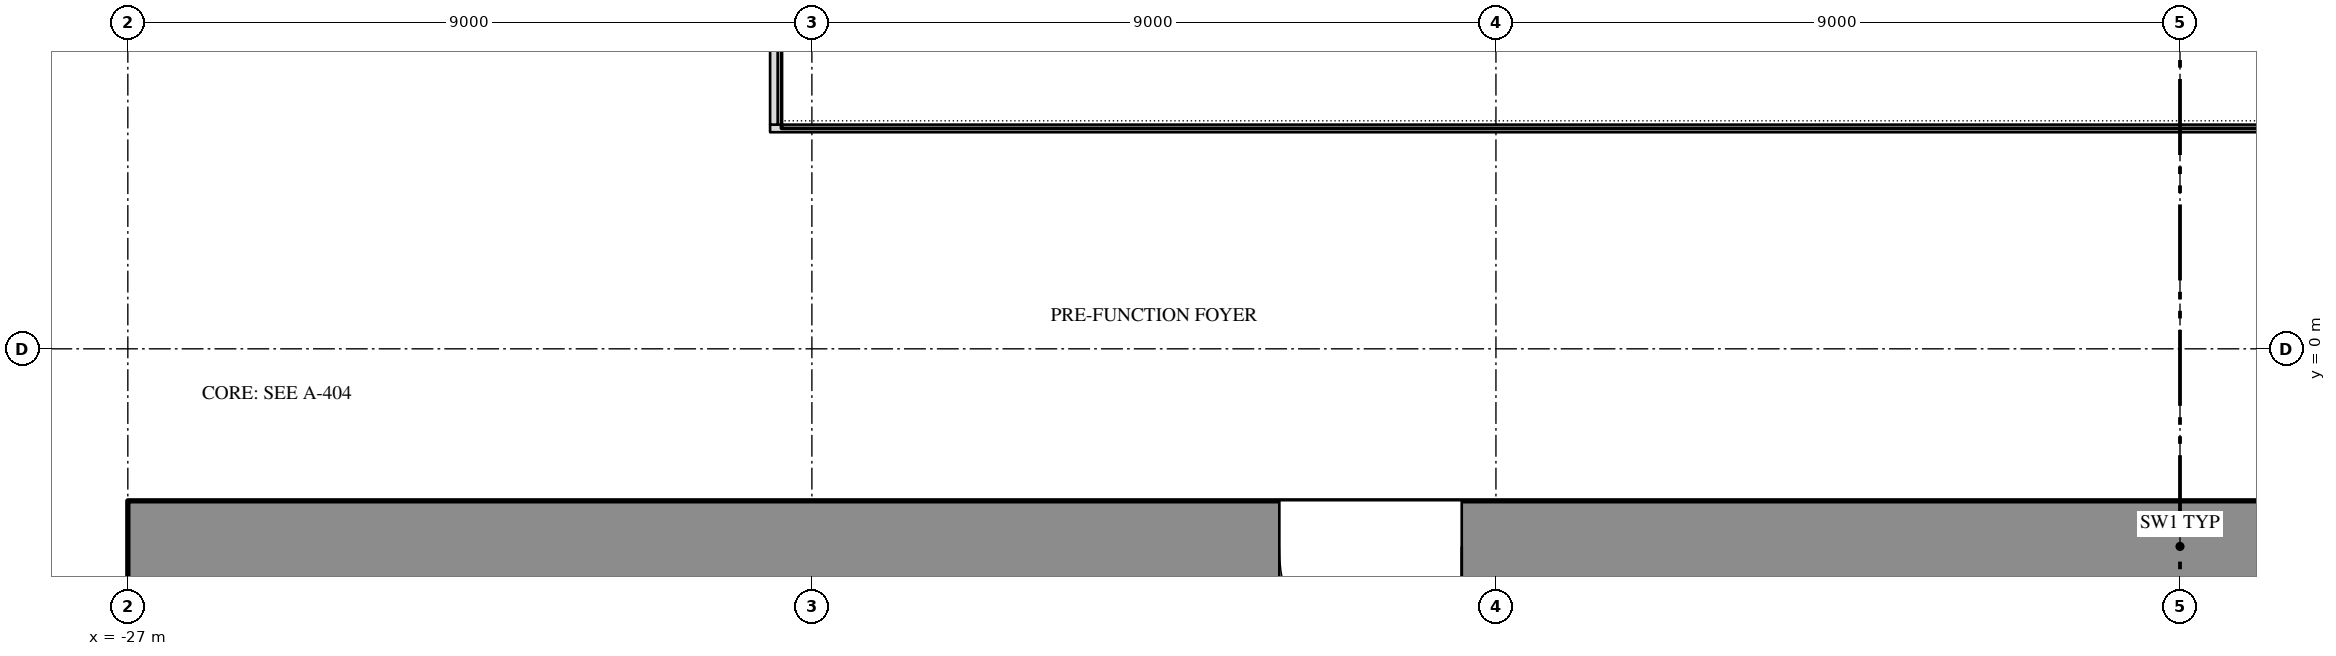
"""IFC4 building model, lengths in metres.
Left out: names, types, materials, properties, quantities, classifications, styles, units other than length and angle.
Written with IfcOpenShell. Run it as: python <this file> out.ifc"""

import sys

from ifc_helpers import new_model, si_unit, direction, frame, frame_2d, origin, place, context, subcontext, project, spatial, rectangle, extrude, element, fill, save


model = new_model("IFC4")
c1 = context("Model", 3, precision=1e-05, world=origin(), true_north=direction((0.0, 1.0)))
c2 = subcontext(c1, "Body", "Model", "MODEL_VIEW")
j1 = project(units=[si_unit("LENGTHUNIT", "METRE"), si_unit("PLANEANGLEUNIT", "RADIAN")], contexts=[c1])
p1 = place(None, origin())
s1 = spatial("IfcSite", under=j1, at=p1, CompositionType="ELEMENT")
p2 = place(p1, origin())
s2 = spatial("IfcBuilding", under=s1, at=p2, CompositionType="ELEMENT")
p3 = place(p2, frame((0.0, 0.0, 43.5)))
s3 = spatial("IfcBuildingStorey", under=s2, at=p3, CompositionType="ELEMENT", Elevation=43.5)
p4 = place(p3, frame((-27.0, -2.6, 0.0), z_axis=(0.0, 0.0, 1.0), x_axis=(1.0, 0.0, 0.0)))
e1 = element("IfcWall", 1, at=p4, inside=s3, PredefinedType="SHEAR", context=c2, shape_type="SweptSolid", body=[
    extrude(rectangle(XDim=54.0, YDim=1.2, at=frame_2d((27.0, 0.0))), origin(), (0.0, 0.0, 1.0), 4.25),
])
p5 = place(p4, frame((15.15, 0.0, 0.0)))
e2 = element("IfcOpeningElement", 2, at=p5, cuts=e1, PredefinedType="OPENING", context=c2, shape_type="SweptSolid", body=[
    extrude(rectangle(XDim=2.4, YDim=2.1, at=frame_2d((1.2, 1.05))), frame((0.0, 0.612, 0.0), z_axis=(0.0, -1.0, 0.0), x_axis=(1.0, 0.0, 0.0)), (0.0, 0.0, 1.0), 1.224),
])
p6 = place(p4, frame((36.45, 0.0, 0.0)))
e3 = element("IfcOpeningElement", 3, at=p6, cuts=e1, PredefinedType="OPENING", context=c2, shape_type="SweptSolid", body=[
    extrude(rectangle(XDim=2.4, YDim=2.1, at=frame_2d((1.2, 1.05))), frame((0.0, 0.612, 0.0), z_axis=(0.0, -1.0, 0.0), x_axis=(1.0, 0.0, 0.0)), (0.0, 0.0, 1.0), 1.224),
])
p7 = place(p3, frame((-18.55, 2.9, 0.0), z_axis=(0.0, 0.0, 1.0), x_axis=(1.0, 0.0, 0.0)))
e4 = element("IfcWall", 4, at=p7, inside=s3, PredefinedType="PARTITIONING", context=c2, shape_type="SweptSolid", body=[
    extrude(rectangle(XDim=51.066, YDim=0.1, at=frame_2d((25.533, 0.0))), origin(), (0.0, 0.0, 1.0), 4.25),
])
p8 = place(p7, frame((40.65, 0.0, 0.0)))
e5 = element("IfcOpeningElement", 5, at=p8, cuts=e4, PredefinedType="OPENING", context=c2, shape_type="SweptSolid", body=[
    extrude(rectangle(XDim=1.8, YDim=2.1, at=frame_2d((0.9, 1.05))), frame((0.0, 0.062, 0.0), z_axis=(0.0, -1.0, 0.0), x_axis=(1.0, 0.0, 0.0)), (0.0, 0.0, 1.0), 0.124),
])
p9 = place(p7, frame((47.55, 0.0, 0.0)))
e6 = element("IfcOpeningElement", 6, at=p9, cuts=e4, PredefinedType="OPENING", context=c2, shape_type="SweptSolid", body=[
    extrude(rectangle(XDim=1.0, YDim=2.1, at=frame_2d((0.5, 1.05))), frame((0.0, 0.062, 0.0), z_axis=(0.0, -1.0, 0.0), x_axis=(1.0, 0.0, 0.0)), (0.0, 0.0, 1.0), 0.124),
])
p10 = place(p3, frame((-18.5, 2.95, 0.0), z_axis=(0.0, 0.0, 1.0), x_axis=(0.0, 1.0, 0.0)))
e7 = element("IfcWall", 7, at=p10, inside=s3, PredefinedType="PARTITIONING", context=c2, shape_type="SweptSolid", body=[
    extrude(rectangle(XDim=1.22, YDim=0.1, at=frame_2d((0.61, 0.0))), origin(), (0.0, 0.0, 1.0), 4.25),
])
p11 = place(p5, origin())
e8 = element("IfcDoor", 8, at=p11, inside=s3, OperationType="DOUBLE_DOOR_SINGLE_SWING", PredefinedType="DOOR", context=c2, shape_type="SweptSolid", body=[
    extrude(rectangle(XDim=2.4, YDim=2.1, at=frame_2d((1.2, 1.05))), frame((0.0, 0.025, 0.0), z_axis=(0.0, -1.0, 0.0), x_axis=(1.0, 0.0, 0.0)), (0.0, 0.0, 1.0), 0.05),
])
fill(e2, e8)
save(model, sys.argv[1])
